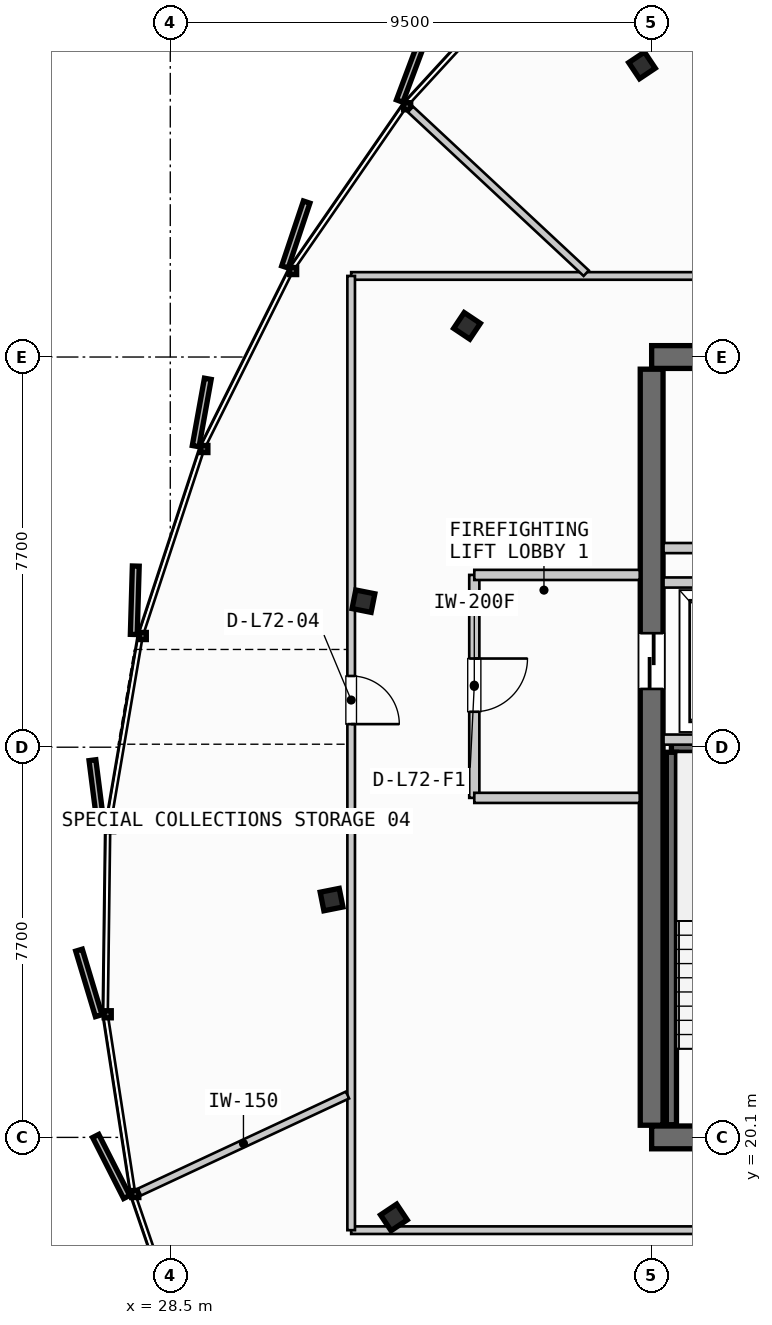
"""IFC4 building model, lengths in metres.
Left out: names, types, materials, properties, quantities, classifications, styles, units other than length and angle.
Written with IfcOpenShell. Run it as: python <this file> out.ifc"""

import sys

from ifc_helpers import new_model, si_unit, direction, frame, frame_2d, origin, origin_2d, place, context, subcontext, project, spatial, rectangle, i_section, extrude, source, transform, mapped, element, fill, save


model = new_model("IFC4")
c1 = context("Model", 3, precision=1e-05, world=origin(), true_north=direction((0.0, 1.0)))
c2 = subcontext(c1, "Body", "Model", "MODEL_VIEW")
j1 = project(units=[si_unit("LENGTHUNIT", "METRE"), si_unit("PLANEANGLEUNIT", "RADIAN")], contexts=[c1])
p1 = place(None, origin())
s1 = spatial("IfcSite", under=j1, at=p1, CompositionType="ELEMENT")
p2 = place(p1, origin())
s2 = spatial("IfcBuilding", under=s1, at=p2, CompositionType="ELEMENT")
p3 = place(p2, frame((0.0, 0.0, 273.25)))
s3 = spatial("IfcBuildingStorey", under=s2, at=p3, CompositionType="ELEMENT", Elevation=273.25)
p4 = place(p3, frame((38.0, 20.1, 0.0), z_axis=(0.0, 0.0, 1.0), x_axis=(1.0, 0.0, 0.0)))
e1 = element("IfcWall", 1, at=p4, inside=s3, PredefinedType="SHEAR", context=c2, shape_type="SweptSolid", body=[
    extrude(rectangle(XDim=17.6, YDim=0.45, at=frame_2d((8.8, 0.0))), origin(), (0.0, 0.0, 1.0), 3.21),
])
p5 = place(p4, frame((1.4, 0.0, 0.0)))
e2 = element("IfcOpeningElement", 2, at=p5, cuts=e1, PredefinedType="OPENING", context=c2, shape_type="SweptSolid", body=[
    extrude(rectangle(XDim=1.05, YDim=2.15, at=frame_2d((0.525, 1.075))), frame((0.0, 0.235, 0.0), z_axis=(0.0, -1.0, 0.0), x_axis=(1.0, 0.0, 0.0)), (0.0, 0.0, 1.0), 0.47),
])
p6 = place(p4, frame((15.15, 0.0, 0.0)))
e3 = element("IfcOpeningElement", 3, at=p6, cuts=e1, PredefinedType="OPENING", context=c2, shape_type="SweptSolid", body=[
    extrude(rectangle(XDim=1.05, YDim=2.15, at=frame_2d((0.525, 1.075))), frame((0.0, 0.235, 0.0), z_axis=(0.0, -1.0, 0.0), x_axis=(1.0, 0.0, 0.0)), (0.0, 0.0, 1.0), 0.47),
])
p7 = place(p4, frame((5.25, 0.0, 0.0)))
e4 = element("IfcOpeningElement", 4, at=p7, cuts=e1, PredefinedType="OPENING", context=c2, shape_type="SweptSolid", body=[
    extrude(rectangle(XDim=0.95, YDim=2.15, at=frame_2d((0.475, 1.075))), frame((0.0, 0.235, 0.0), z_axis=(0.0, -1.0, 0.0), x_axis=(1.0, 0.0, 0.0)), (0.0, 0.0, 1.0), 0.47),
])
p8 = place(p4, frame((11.4, 0.0, 0.0)))
e5 = element("IfcOpeningElement", 5, at=p8, cuts=e1, PredefinedType="OPENING", context=c2, shape_type="SweptSolid", body=[
    extrude(rectangle(XDim=0.95, YDim=2.15, at=frame_2d((0.475, 1.075))), frame((0.0, 0.235, 0.0), z_axis=(0.0, -1.0, 0.0), x_axis=(1.0, 0.0, 0.0)), (0.0, 0.0, 1.0), 0.47),
])
p9 = place(p3, frame((55.6, 35.5, 0.0), z_axis=(0.0, 0.0, 1.0), x_axis=(-1.0, 0.0, 0.0)))
e6 = element("IfcWall", 6, at=p9, inside=s3, PredefinedType="SHEAR", context=c2, shape_type="SweptSolid", body=[
    extrude(rectangle(XDim=17.6, YDim=0.45, at=frame_2d((8.8, 0.0))), origin(), (0.0, 0.0, 1.0), 3.21),
])
p10 = place(p9, frame((8.05, 0.0, 0.0)))
e7 = element("IfcOpeningElement", 7, at=p10, cuts=e6, PredefinedType="OPENING", context=c2, shape_type="SweptSolid", body=[
    extrude(rectangle(XDim=1.5, YDim=2.2, at=frame_2d((0.75, 1.1))), frame((0.0, 0.235, 0.0), z_axis=(0.0, -1.0, 0.0), x_axis=(1.0, 0.0, 0.0)), (0.0, 0.0, 1.0), 0.47),
])
p11 = place(p9, frame((15.85, 0.0, 0.0)))
e8 = element("IfcOpeningElement", 8, at=p11, cuts=e6, PredefinedType="OPENING", context=c2, shape_type="SweptSolid", body=[
    extrude(rectangle(XDim=0.85, YDim=2.15, at=frame_2d((0.425, 1.075))), frame((0.0, 0.235, 0.0), z_axis=(0.0, -1.0, 0.0), x_axis=(1.0, 0.0, 0.0)), (0.0, 0.0, 1.0), 0.47),
])
p12 = place(p9, frame((14.35, 0.0, 0.0)))
e9 = element("IfcOpeningElement", 9, at=p12, cuts=e6, PredefinedType="OPENING", context=c2, shape_type="SweptSolid", body=[
    extrude(rectangle(XDim=0.85, YDim=2.15, at=frame_2d((0.425, 1.075))), frame((0.0, 0.235, 0.0), z_axis=(0.0, -1.0, 0.0), x_axis=(1.0, 0.0, 0.0)), (0.0, 0.0, 1.0), 0.47),
])
p13 = place(p9, frame((12.3, 0.0, 0.0)))
e10 = element("IfcOpeningElement", 10, at=p13, cuts=e6, PredefinedType="OPENING", context=c2, shape_type="SweptSolid", body=[
    extrude(rectangle(XDim=0.95, YDim=2.15, at=frame_2d((0.475, 1.075))), frame((0.0, 0.235, 0.0), z_axis=(0.0, -1.0, 0.0), x_axis=(1.0, 0.0, 0.0)), (0.0, 0.0, 1.0), 0.47),
])
p14 = place(p9, frame((10.2, 0.0, 0.0)))
e11 = element("IfcOpeningElement", 11, at=p14, cuts=e6, PredefinedType="OPENING", context=c2, shape_type="SweptSolid", body=[
    extrude(rectangle(XDim=0.9, YDim=2.15, at=frame_2d((0.45, 1.075))), frame((0.0, 0.235, 0.0), z_axis=(0.0, -1.0, 0.0), x_axis=(1.0, 0.0, 0.0)), (0.0, 0.0, 1.0), 0.47),
])
p15 = place(p3, frame((38.0, 35.26, 0.0), z_axis=(0.0, 0.0, 1.0), x_axis=(0.0, -1.0, 0.0)))
e12 = element("IfcWall", 12, at=p15, inside=s3, PredefinedType="SHEAR", context=c2, shape_type="SweptSolid", body=[
    extrude(rectangle(XDim=14.92, YDim=0.45, at=frame_2d((7.46, 0.0))), origin(), (0.0, 0.0, 1.0), 3.21),
])
p16 = place(p15, frame((5.21, 0.0, 0.0)))
e13 = element("IfcOpeningElement", 13, at=p16, cuts=e12, PredefinedType="OPENING", context=c2, shape_type="SweptSolid", body=[
    extrude(rectangle(XDim=1.1, YDim=2.2, at=frame_2d((0.55, 1.1))), frame((0.0, 0.235, 0.0), z_axis=(0.0, -1.0, 0.0), x_axis=(1.0, 0.0, 0.0)), (0.0, 0.0, 1.0), 0.47),
])
m1 = source(origin(), c2, "Body", "SweptSolid", [
    extrude(i_section(OverallWidth=0.374, OverallDepth=0.383, WebThickness=0.017, FlangeThickness=0.026, FilletRadius=0.015, at=origin_2d()), origin(), (0.0, 0.0, 1.0), 3.21),
])
for number, where, z_axis, x_axis in (
    (14, (37.81, 41.255, 0.0), (0.0, 0.0, 1.0), (-0.556, 0.831, 0.0)),
    (15, (34.356, 36.115, 0.0), (0.0, 0.0, 1.0), (-0.831, 0.556, 0.0)),
    (16, (32.312, 30.682, 0.0), (0.0, 0.0, 1.0), (-0.981, 0.195, 0.0)),
    (17, (31.683, 24.793, 0.0), (0.0, 0.0, 1.0), (-0.981, -0.195, 0.0)),
    (18, (32.913, 18.521, 0.0), (0.0, 0.0, 1.0), (-0.831, -0.556, 0.0)),
):
    element("IfcColumn", number, at=place(p3, frame(where, z_axis=z_axis, x_axis=x_axis)), inside=s3, PredefinedType="COLUMN", context=c2, shape_type="MappedRepresentation", body=[
        mapped(m1, transform((0.0, 0.0, 0.0), scale=1.0)),
    ])
p17 = place(p3, frame((38.39, 27.8, 0.0), z_axis=(0.0, 0.0, 1.0), x_axis=(1.0, 0.0, 0.0)))
e19 = element("IfcWall", 19, at=p17, inside=s3, PredefinedType="SHEAR", context=c2, shape_type="SweptSolid", body=[
    extrude(rectangle(XDim=3.06, YDim=0.2, at=frame_2d((1.53, 0.0))), origin(), (0.0, 0.0, 1.0), 3.21),
])
p18 = place(p3, frame((38.39, 20.35, 0.0), z_axis=(0.0, 0.0, 1.0), x_axis=(0.0, 1.0, 0.0)))
e20 = element("IfcWall", 20, at=p18, inside=s3, PredefinedType="SHEAR", context=c2, shape_type="SweptSolid", body=[
    extrude(rectangle(XDim=7.35, YDim=0.2, at=frame_2d((3.675, 0.0))), origin(), (0.0, 0.0, 1.0), 3.21),
])
for number, where, z_axis, x_axis in (
    (21, (38.235, 27.95, 0.0), (0.0, 0.0, 1.0), (1.0, 0.0, 0.0)),
    (22, (38.235, 31.05, 0.0), (0.0, 0.0, 1.0), (1.0, 0.0, 0.0)),
):
    element("IfcWall", number, at=place(p3, frame(where, z_axis=z_axis, x_axis=x_axis)), inside=s3, PredefinedType="PARTITIONING", context=c2, shape_type="SweptSolid", body=[
        extrude(rectangle(XDim=2.915, YDim=0.2, at=frame_2d((1.458, 0.0))), origin(), (0.0, 0.0, 1.0), 2.595),
    ])
p19 = place(p3, frame((34.5, 31.2, 0.0), z_axis=(0.0, 0.0, 1.0), x_axis=(0.0, -1.0, 0.0)))
e23 = element("IfcWall", 23, at=p19, inside=s3, PredefinedType="PARTITIONING", context=c2, shape_type="SweptSolid", body=[
    extrude(rectangle(XDim=4.4, YDim=0.2, at=frame_2d((2.2, 0.0))), origin(), (0.0, 0.0, 1.0), 2.595),
])
p20 = place(p19, frame((1.65, 0.0, 0.0)))
e24 = element("IfcOpeningElement", 24, at=p20, cuts=e23, PredefinedType="OPENING", context=c2, shape_type="SweptSolid", body=[
    extrude(rectangle(XDim=1.05, YDim=2.15, at=frame_2d((0.525, 1.075))), frame((0.0, 0.11, 0.0), z_axis=(0.0, -1.0, 0.0), x_axis=(1.0, 0.0, 0.0)), (0.0, 0.0, 1.0), 0.22),
])
for number, where, z_axis, x_axis in (
    (25, (34.5, 26.8, 0.0), (0.0, 0.0, 1.0), (1.0, 0.0, 0.0)),
    (26, (34.5, 31.2, 0.0), (0.0, 0.0, 1.0), (1.0, 0.0, 0.0)),
):
    element("IfcWall", number, at=place(p3, frame(where, z_axis=z_axis, x_axis=x_axis)), inside=s3, PredefinedType="PARTITIONING", context=c2, shape_type="SweptSolid", body=[
        extrude(rectangle(XDim=3.265, YDim=0.2, at=frame_2d((1.632, 0.0))), origin(), (0.0, 0.0, 1.0), 2.595),
    ])
p21 = place(p3, frame((38.235, 31.73, 0.0), z_axis=(0.0, 0.0, 1.0), x_axis=(1.0, 0.0, 0.0)))
e27 = element("IfcWall", 27, at=p21, inside=s3, PredefinedType="PARTITIONING", context=c2, shape_type="SweptSolid", body=[
    extrude(rectangle(XDim=7.565, YDim=0.2, at=frame_2d((3.782, 0.0))), origin(), (0.0, 0.0, 1.0), 2.595),
])
p22 = place(p3, frame((32.07, 18.269, 0.0), z_axis=(0.0, 0.0, 1.0), x_axis=(1.0, 0.0, 0.0)))
e28 = element("IfcWall", 28, at=p22, inside=s3, PredefinedType="PARTITIONING", context=c2, shape_type="SweptSolid", body=[
    extrude(rectangle(XDim=29.156, YDim=0.15, at=frame_2d((14.578, 0.0))), origin(), (0.0, 0.0, 1.0), 2.595),
])
p23 = place(p22, frame((12.404, 0.0, 0.0)))
e29 = element("IfcOpeningElement", 29, at=p23, cuts=e28, PredefinedType="OPENING", context=c2, shape_type="SweptSolid", body=[
    extrude(rectangle(XDim=0.95, YDim=2.15, at=frame_2d((0.475, 1.075))), frame((0.0, 0.085, 0.0), z_axis=(0.0, -1.0, 0.0), x_axis=(1.0, 0.0, 0.0)), (0.0, 0.0, 1.0), 0.17),
])
p24 = place(p3, frame((61.226, 37.1, 0.0), z_axis=(0.0, 0.0, 1.0), x_axis=(-1.0, 0.0, 0.0)))
e30 = element("IfcWall", 30, at=p24, inside=s3, PredefinedType="PARTITIONING", context=c2, shape_type="SweptSolid", body=[
    extrude(rectangle(XDim=29.156, YDim=0.15, at=frame_2d((14.578, 0.0))), origin(), (0.0, 0.0, 1.0), 2.595),
])
p25 = place(p24, frame((12.11, 0.0, 0.0)))
e31 = element("IfcOpeningElement", 31, at=p25, cuts=e30, PredefinedType="OPENING", context=c2, shape_type="SweptSolid", body=[
    extrude(rectangle(XDim=0.95, YDim=2.15, at=frame_2d((0.475, 1.075))), frame((0.0, 0.085, 0.0), z_axis=(0.0, -1.0, 0.0), x_axis=(1.0, 0.0, 0.0)), (0.0, 0.0, 1.0), 0.17),
])
p26 = place(p3, frame((32.07, 37.1, 0.0), z_axis=(0.0, 0.0, 1.0), x_axis=(0.0, -1.0, 0.0)))
e32 = element("IfcWall", 32, at=p26, inside=s3, PredefinedType="PARTITIONING", context=c2, shape_type="SweptSolid", body=[
    extrude(rectangle(XDim=18.831, YDim=0.15, at=frame_2d((9.416, 0.0))), origin(), (0.0, 0.0, 1.0), 2.595),
])
p27 = place(p26, frame((7.894, 0.0, 0.0)))
e33 = element("IfcOpeningElement", 33, at=p27, cuts=e32, PredefinedType="OPENING", context=c2, shape_type="SweptSolid", body=[
    extrude(rectangle(XDim=0.95, YDim=2.15, at=frame_2d((0.475, 1.075))), frame((0.0, 0.085, 0.0), z_axis=(0.0, -1.0, 0.0), x_axis=(1.0, 0.0, 0.0)), (0.0, 0.0, 1.0), 0.17),
])
p28 = place(p3, frame((31.998, 20.936, 0.0), z_axis=(0.0, 0.0, 1.0), x_axis=(-0.906272593061, -0.422693727263, 0.0)))
e34 = element("IfcWall", 34, at=p28, inside=s3, PredefinedType="PARTITIONING", context=c2, shape_type="SweptSolid", body=[
    extrude(rectangle(XDim=4.531, YDim=0.15, at=frame_2d((2.266, 0.0))), origin(), (0.0, 0.0, 1.0), 2.595),
])
p29 = place(p3, frame((36.709, 37.155, 0.0), z_axis=(0.0, 0.0, 1.0), x_axis=(-0.731440422575, 0.681905351367, 0.0)))
e35 = element("IfcWall", 35, at=p29, inside=s3, PredefinedType="PARTITIONING", context=c2, shape_type="SweptSolid", body=[
    extrude(rectangle(XDim=4.741, YDim=0.15, at=frame_2d((2.371, 0.0))), origin(), (0.0, 0.0, 1.0), 2.595),
])
m2 = source(origin(), c2, "Body", "SweptSolid", [
    extrude(rectangle(XDim=1.1, YDim=2.2, at=frame_2d((0.55, 1.1))), frame((0.0, 0.025, 0.0), z_axis=(0.0, -1.0, 0.0), x_axis=(1.0, 0.0, 0.0)), (0.0, 0.0, 1.0), 0.05),
])
p30 = place(p16, origin())
e36 = element("IfcDoor", 36, at=p30, inside=s3, OperationType="SLIDING_TO_LEFT", PredefinedType="DOOR", context=c2, shape_type="MappedRepresentation", body=[
    mapped(m2, transform((0.0, 0.0, 0.0), scale=1.0)),
])
fill(e13, e36)
m3 = source(origin(), c2, "Body", "SweptSolid", [
    extrude(rectangle(XDim=1.05, YDim=2.15, at=frame_2d((0.525, 1.075))), frame((0.0, 0.025, 0.0), z_axis=(0.0, -1.0, 0.0), x_axis=(1.0, 0.0, 0.0)), (0.0, 0.0, 1.0), 0.05),
])
p31 = place(p20, origin())
e37 = element("IfcDoor", 37, at=p31, inside=s3, OperationType="SINGLE_SWING_LEFT", PredefinedType="DOOR", context=c2, shape_type="MappedRepresentation", body=[
    mapped(m3, transform((0.0, 0.0, 0.0), scale=1.0)),
])
fill(e24, e37)
m4 = source(origin(), c2, "Body", "SweptSolid", [
    extrude(rectangle(XDim=0.95, YDim=2.15, at=frame_2d((0.475, 1.075))), frame((0.0, 0.025, 0.0), z_axis=(0.0, -1.0, 0.0), x_axis=(1.0, 0.0, 0.0)), (0.0, 0.0, 1.0), 0.05),
])
p32 = place(p27, origin())
e38 = element("IfcDoor", 38, at=p32, inside=s3, OperationType="SINGLE_SWING_RIGHT", PredefinedType="DOOR", context=c2, shape_type="MappedRepresentation", body=[
    mapped(m4, transform((0.0, 0.0, 0.0), scale=1.0)),
])
fill(e33, e38)
save(model, sys.argv[1])
